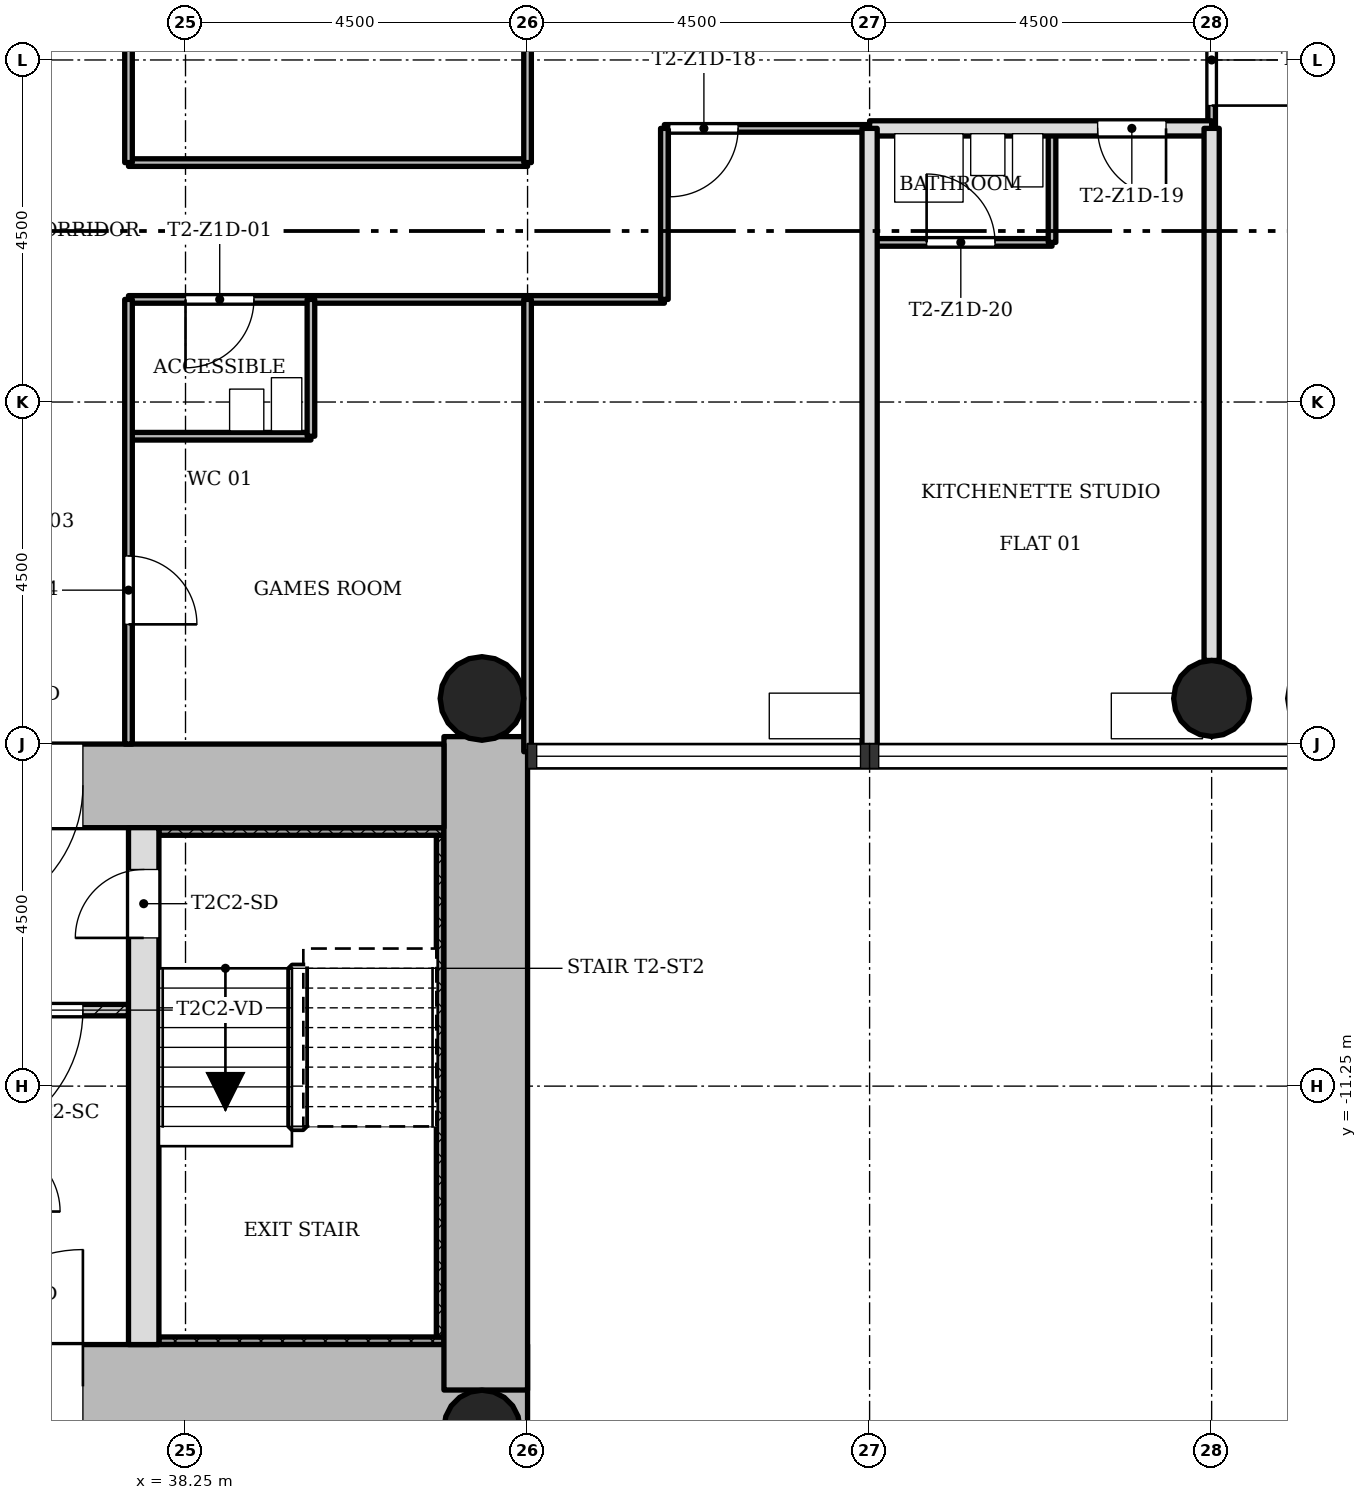
"""IFC4 building model, lengths in metres.
Left out: names, types, materials, properties, quantities, classifications, styles, units other than length and angle.
Written with IfcOpenShell. Run it as: python <this file> out.ifc"""

import sys

from ifc_helpers import new_model, si_unit, direction, frame, frame_2d, origin, origin_2d, place, context, subcontext, project, spatial, rectangle, hollow_circle, extrude, element, fill, save


model = new_model("IFC4")
c1 = context("Model", 3, precision=1e-05, world=origin(), true_north=direction((0.0, 1.0)))
c2 = subcontext(c1, "Body", "Model", "MODEL_VIEW")
j1 = project(units=[si_unit("LENGTHUNIT", "METRE"), si_unit("PLANEANGLEUNIT", "RADIAN")], contexts=[c1])
p1 = place(None, origin())
s1 = spatial("IfcSite", under=j1, at=p1, CompositionType="ELEMENT")
p2 = place(p1, origin())
s2 = spatial("IfcBuilding", under=s1, at=p2, CompositionType="ELEMENT")
p3 = place(p2, frame((0.0, 0.0, 61.9)))
s3 = spatial("IfcBuildingStorey", under=s2, at=p3, CompositionType="ELEMENT", Elevation=61.9)
p4 = place(p3, frame((30.35, -15.2, 0.0), z_axis=(0.0, 0.0, 1.0), x_axis=(1.0, 0.0, 0.0)))
e1 = element("IfcWall", 1, at=p4, inside=s3, PredefinedType="SHEAR", context=c2, shape_type="SweptSolid", body=[
    extrude(rectangle(XDim=12.4, YDim=1.1, at=frame_2d((6.2, 0.0))), origin(), (0.0, 0.0, 1.0), 3.4),
])
p5 = place(p4, frame((4.75, 0.0, 0.0)))
e2 = element("IfcOpeningElement", 2, at=p5, cuts=e1, PredefinedType="OPENING", context=c2, shape_type="SweptSolid", body=[
    extrude(rectangle(XDim=1.8, YDim=2.1, at=frame_2d((0.9, 1.05))), frame((0.0, 0.56, 0.0), z_axis=(0.0, -1.0, 0.0), x_axis=(1.0, 0.0, 0.0)), (0.0, 0.0, 1.0), 1.12),
])
p6 = place(p3, frame((42.2, -15.248, 0.0), z_axis=(0.0, 0.0, 1.0), x_axis=(0.0, 1.0, 0.0)))
e3 = element("IfcWall", 3, at=p6, inside=s3, PredefinedType="SHEAR", context=c2, shape_type="SweptSolid", body=[
    extrude(rectangle(XDim=8.596, YDim=1.1, at=frame_2d((4.298, 0.0))), origin(), (0.0, 0.0, 1.0), 3.4),
])
p7 = place(p3, frame((41.65, -7.3, 0.0), z_axis=(0.0, 0.0, 1.0), x_axis=(-1.0, 0.0, 0.0)))
e4 = element("IfcWall", 4, at=p7, inside=s3, PredefinedType="SHEAR", context=c2, shape_type="SweptSolid", body=[
    extrude(rectangle(XDim=12.4, YDim=1.1, at=frame_2d((6.2, 0.0))), origin(), (0.0, 0.0, 1.0), 3.4),
])
p8 = place(p7, frame((4.75, 0.0, 0.0)))
e5 = element("IfcOpeningElement", 5, at=p8, cuts=e4, PredefinedType="OPENING", context=c2, shape_type="SweptSolid", body=[
    extrude(rectangle(XDim=1.8, YDim=2.1, at=frame_2d((0.9, 1.05))), frame((0.0, 0.56, 0.0), z_axis=(0.0, -1.0, 0.0), x_axis=(1.0, 0.0, 0.0)), (0.0, 0.0, 1.0), 1.12),
])
p9 = place(p3, frame((37.7, -14.65, 0.0), z_axis=(0.0, 0.0, 1.0), x_axis=(0.0, 1.0, 0.0)))
e6 = element("IfcWall", 6, at=p9, inside=s3, PredefinedType="SHEAR", context=c2, shape_type="SweptSolid", body=[
    extrude(rectangle(XDim=6.8, YDim=0.4, at=frame_2d((3.4, 0.0))), origin(), (0.0, 0.0, 1.0), 3.4),
])
p10 = place(p9, frame((5.35, 0.0, 0.0)))
e7 = element("IfcOpeningElement", 7, at=p10, cuts=e6, PredefinedType="OPENING", context=c2, shape_type="SweptSolid", body=[
    extrude(rectangle(XDim=0.9, YDim=2.1, at=frame_2d((0.45, 1.05))), frame((0.0, 0.21, 0.0), z_axis=(0.0, -1.0, 0.0), x_axis=(1.0, 0.0, 0.0)), (0.0, 0.0, 1.0), 0.42),
])
for number, where, z_axis, x_axis in (
    (8, (42.15, -15.75, 0.0), (0.0, 0.0, 1.0), (1.0, 0.0, 0.0)),
    (9, (51.75, -6.15, 0.0), (0.0, 0.0, 1.0), (1.0, 0.0, 0.0)),
):
    element("IfcColumn", number, at=place(p3, frame(where, z_axis=z_axis, x_axis=x_axis)), inside=s3, PredefinedType="COLUMN", context=c2, shape_type="SweptSolid", body=[
        extrude(hollow_circle(Radius=0.5, WallThickness=0.036, at=origin_2d()), origin(), (0.0, 0.0, 1.0), 3.4),
    ])
p11 = place(p3, frame((42.15, -6.15, 0.0), z_axis=(0.0, 0.0, 1.0), x_axis=(1.0, 0.0, 0.0)))
e10 = element("IfcColumn", 10, at=p11, inside=s3, PredefinedType="COLUMN", context=c2, shape_type="SweptSolid", body=[
    extrude(hollow_circle(Radius=0.55, WallThickness=0.04, at=origin_2d()), origin(), (0.0, 0.0, 1.0), 3.4),
])
p12 = place(p3, frame((34.5, -10.25, 0.0), z_axis=(0.0, 0.0, 1.0), x_axis=(1.0, 0.0, 0.0)))
e11 = element("IfcWall", 11, at=p12, inside=s3, PredefinedType="PARTITIONING", context=c2, shape_type="SweptSolid", body=[
    extrude(rectangle(XDim=3.0, YDim=0.15, at=frame_2d((1.5, 0.0))), origin(), (0.0, 0.0, 1.0), 3.0),
])
p13 = place(p12, frame((0.6, 0.0, 0.0)))
e12 = element("IfcOpeningElement", 12, at=p13, cuts=e11, PredefinedType="OPENING", context=c2, shape_type="SweptSolid", body=[
    extrude(rectangle(XDim=1.8, YDim=2.1, at=frame_2d((0.9, 1.05))), frame((0.0, 0.085, 0.0), z_axis=(0.0, -1.0, 0.0), x_axis=(1.0, 0.0, 0.0)), (0.0, 0.0, 1.0), 0.17),
])
p14 = place(p3, frame((39.9, -2.7, 0.0), z_axis=(0.0, 0.0, 1.0), x_axis=(-1.0, 0.0, 0.0)))
e13 = element("IfcWall", 13, at=p14, inside=s3, PredefinedType="PARTITIONING", context=c2, shape_type="SweptSolid", body=[
    extrude(rectangle(XDim=2.4, YDim=0.1, at=frame_2d((1.2, 0.0))), origin(), (0.0, 0.0, 1.0), 3.0),
])
p15 = place(p3, frame((44.55, -0.9, 0.0), z_axis=(0.0, 0.0, 1.0), x_axis=(-1.0, 0.0, 0.0)))
e14 = element("IfcWall", 14, at=p15, inside=s3, PredefinedType="PARTITIONING", context=c2, shape_type="SweptSolid", body=[
    extrude(rectangle(XDim=7.05, YDim=0.1, at=frame_2d((3.525, 0.0))), origin(), (0.0, 0.0, 1.0), 3.0),
])
p16 = place(p15, frame((5.4, 0.0, 0.0)))
e15 = element("IfcOpeningElement", 15, at=p16, cuts=e14, PredefinedType="OPENING", context=c2, shape_type="SweptSolid", body=[
    extrude(rectangle(XDim=0.9, YDim=2.1, at=frame_2d((0.45, 1.05))), frame((0.0, 0.06, 0.0), z_axis=(0.0, -1.0, 0.0), x_axis=(1.0, 0.0, 0.0)), (0.0, 0.0, 1.0), 0.12),
])
p17 = place(p3, frame((49.65, -0.15, 0.0), z_axis=(0.0, 0.0, 1.0), x_axis=(-1.0, 0.0, 0.0)))
e16 = element("IfcWall", 16, at=p17, inside=s3, PredefinedType="PARTITIONING", context=c2, shape_type="SweptSolid", body=[
    extrude(rectangle(XDim=2.4, YDim=0.1, at=frame_2d((1.2, 0.0))), origin(), (0.0, 0.0, 1.0), 3.0),
])
p18 = place(p17, frame((0.75, 0.0, 0.0)))
e17 = element("IfcOpeningElement", 17, at=p18, cuts=e16, PredefinedType="OPENING", context=c2, shape_type="SweptSolid", body=[
    extrude(rectangle(XDim=0.9, YDim=2.1, at=frame_2d((0.45, 1.05))), frame((0.0, 0.06, 0.0), z_axis=(0.0, -1.0, 0.0), x_axis=(1.0, 0.0, 0.0)), (0.0, 0.0, 1.0), 0.12),
])
p19 = place(p3, frame((42.75, 0.9, 0.0), z_axis=(0.0, 0.0, 1.0), x_axis=(-1.0, 0.0, 0.0)))
e18 = element("IfcWall", 18, at=p19, inside=s3, PredefinedType="PARTITIONING", context=c2, shape_type="SweptSolid", body=[
    extrude(rectangle(XDim=5.25, YDim=0.1, at=frame_2d((2.625, 0.0))), origin(), (0.0, 0.0, 1.0), 3.0),
])
p20 = place(p3, frame((47.25, 1.35, 0.0), z_axis=(0.0, 0.0, 1.0), x_axis=(-1.0, 0.0, 0.0)))
e19 = element("IfcWall", 19, at=p20, inside=s3, PredefinedType="PARTITIONING", context=c2, shape_type="SweptSolid", body=[
    extrude(rectangle(XDim=2.7, YDim=0.1, at=frame_2d((1.35, 0.0))), origin(), (0.0, 0.0, 1.0), 3.0),
])
p21 = place(p20, frame((1.73, 0.0, 0.0)))
e20 = element("IfcOpeningElement", 20, at=p21, cuts=e19, PredefinedType="OPENING", context=c2, shape_type="SweptSolid", body=[
    extrude(rectangle(XDim=0.9, YDim=2.1, at=frame_2d((0.45, 1.05))), frame((0.0, 0.06, 0.0), z_axis=(0.0, -1.0, 0.0), x_axis=(1.0, 0.0, 0.0)), (0.0, 0.0, 1.0), 0.12),
])
p22 = place(p3, frame((51.75, 1.35, 0.0), z_axis=(0.0, 0.0, 1.0), x_axis=(-1.0, 0.0, 0.0)))
e21 = element("IfcWall", 21, at=p22, inside=s3, PredefinedType="SOLIDWALL", context=c2, shape_type="SweptSolid", body=[
    extrude(rectangle(XDim=4.5, YDim=0.2, at=frame_2d((2.25, 0.0))), origin(), (0.0, 0.0, 1.0), 3.0),
])
p23 = place(p22, frame((0.6, 0.0, 0.0)))
e22 = element("IfcOpeningElement", 22, at=p23, cuts=e21, PredefinedType="OPENING", context=c2, shape_type="SweptSolid", body=[
    extrude(rectangle(XDim=0.9, YDim=2.1, at=frame_2d((0.45, 1.05))), frame((0.0, 0.11, 0.0), z_axis=(0.0, -1.0, 0.0), x_axis=(1.0, 0.0, 0.0)), (0.0, 0.0, 1.0), 0.22),
])
p24 = place(p3, frame((51.75, 1.35, 0.0), z_axis=(0.0, 0.0, 1.0), x_axis=(0.0, 1.0, 0.0)))
e23 = element("IfcWall", 23, at=p24, inside=s3, PredefinedType="PARTITIONING", context=c2, shape_type="SweptSolid", body=[
    extrude(rectangle(XDim=4.3, YDim=0.1, at=frame_2d((2.15, 0.0))), origin(), (0.0, 0.0, 1.0), 3.0),
])
p25 = place(p24, frame((0.3, 0.0, 0.0)))
e24 = element("IfcOpeningElement", 24, at=p25, cuts=e23, PredefinedType="OPENING", context=c2, shape_type="SweptSolid", body=[
    extrude(rectangle(XDim=1.2, YDim=2.1, at=frame_2d((0.6, 1.05))), frame((0.0, 0.06, 0.0), z_axis=(0.0, -1.0, 0.0), x_axis=(1.0, 0.0, 0.0)), (0.0, 0.0, 1.0), 0.12),
])
p26 = place(p3, frame((51.75, -5.65, 0.0), z_axis=(0.0, 0.0, 1.0), x_axis=(0.0, 1.0, 0.0)))
e25 = element("IfcWall", 25, at=p26, inside=s3, PredefinedType="SOLIDWALL", context=c2, shape_type="SweptSolid", body=[
    extrude(rectangle(XDim=7.0, YDim=0.2, at=frame_2d((3.5, 0.0))), origin(), (0.0, 0.0, 1.0), 3.0),
])
p27 = place(p3, frame((49.65, -0.15, 0.0), z_axis=(0.0, 0.0, 1.0), x_axis=(0.0, 1.0, 0.0)))
e26 = element("IfcWall", 26, at=p27, inside=s3, PredefinedType="PARTITIONING", context=c2, shape_type="SweptSolid", body=[
    extrude(rectangle(XDim=1.5, YDim=0.1, at=frame_2d((0.75, 0.0))), origin(), (0.0, 0.0, 1.0), 3.0),
])
p28 = place(p3, frame((47.25, -6.85, 0.0), z_axis=(0.0, 0.0, 1.0), x_axis=(0.0, 1.0, 0.0)))
e27 = element("IfcWall", 27, at=p28, inside=s3, PredefinedType="SOLIDWALL", context=c2, shape_type="SweptSolid", body=[
    extrude(rectangle(XDim=8.2, YDim=0.2, at=frame_2d((4.1, 0.0))), origin(), (0.0, 0.0, 1.0), 3.0),
])
p29 = place(p3, frame((44.55, -0.9, 0.0), z_axis=(0.0, 0.0, 1.0), x_axis=(0.0, 1.0, 0.0)))
e28 = element("IfcWall", 28, at=p29, inside=s3, PredefinedType="PARTITIONING", context=c2, shape_type="SweptSolid", body=[
    extrude(rectangle(XDim=2.25, YDim=0.1, at=frame_2d((1.125, 0.0))), origin(), (0.0, 0.0, 1.0), 3.0),
])
for number, where, z_axis, x_axis in (
    (29, (42.75, -6.85, 0.0), (0.0, 0.0, 1.0), (0.0, 1.0, 0.0)),
    (30, (42.75, 0.9, 0.0), (0.0, 0.0, 1.0), (0.0, 1.0, 0.0)),
):
    element("IfcWall", number, at=place(p3, frame(where, z_axis=z_axis, x_axis=x_axis)), inside=s3, PredefinedType="PARTITIONING", context=c2, shape_type="SweptSolid", body=[
        extrude(rectangle(XDim=5.95, YDim=0.1, at=frame_2d((2.975, 0.0))), origin(), (0.0, 0.0, 1.0), 3.0),
    ])
p30 = place(p3, frame((39.9, -2.7, 0.0), z_axis=(0.0, 0.0, 1.0), x_axis=(0.0, 1.0, 0.0)))
e31 = element("IfcWall", 31, at=p30, inside=s3, PredefinedType="PARTITIONING", context=c2, shape_type="SweptSolid", body=[
    extrude(rectangle(XDim=1.8, YDim=0.1, at=frame_2d((0.9, 0.0))), origin(), (0.0, 0.0, 1.0), 3.0),
])
p31 = place(p3, frame((37.5, -6.75, 0.0), z_axis=(0.0, 0.0, 1.0), x_axis=(0.0, 1.0, 0.0)))
e32 = element("IfcWall", 32, at=p31, inside=s3, PredefinedType="PARTITIONING", context=c2, shape_type="SweptSolid", body=[
    extrude(rectangle(XDim=5.85, YDim=0.1, at=frame_2d((2.925, 0.0))), origin(), (0.0, 0.0, 1.0), 3.0),
])
p32 = place(p31, frame((1.575, 0.0, 0.0)))
e33 = element("IfcOpeningElement", 33, at=p32, cuts=e32, PredefinedType="OPENING", context=c2, shape_type="SweptSolid", body=[
    extrude(rectangle(XDim=0.9, YDim=2.1, at=frame_2d((0.45, 1.05))), frame((0.0, 0.06, 0.0), z_axis=(0.0, -1.0, 0.0), x_axis=(1.0, 0.0, 0.0)), (0.0, 0.0, 1.0), 0.12),
])
p33 = place(p3, frame((37.5, 0.9, 0.0), z_axis=(0.0, 0.0, 1.0), x_axis=(0.0, 1.0, 0.0)))
e34 = element("IfcWall", 34, at=p33, inside=s3, PredefinedType="PARTITIONING", context=c2, shape_type="SweptSolid", body=[
    extrude(rectangle(XDim=5.85, YDim=0.1, at=frame_2d((2.925, 0.0))), origin(), (0.0, 0.0, 1.0), 3.0),
])
p34 = place(p33, frame((2.475, 0.0, 0.0)))
e35 = element("IfcOpeningElement", 35, at=p34, cuts=e34, PredefinedType="OPENING", context=c2, shape_type="SweptSolid", body=[
    extrude(rectangle(XDim=0.9, YDim=2.1, at=frame_2d((0.45, 1.05))), frame((0.0, 0.06, 0.0), z_axis=(0.0, -1.0, 0.0), x_axis=(1.0, 0.0, 0.0)), (0.0, 0.0, 1.0), 0.12),
])
p35 = place(p3, frame((37.9, -14.6, 0.0), z_axis=(0.0, 0.0, 1.0), x_axis=(1.0, 0.0, 0.0)))
e36 = element("IfcWall", 36, at=p35, inside=s3, PredefinedType="SHEAR", context=c2, shape_type="SweptSolid", body=[
    extrude(rectangle(XDim=3.75, YDim=0.1, at=frame_2d((1.875, 0.0))), origin(), (0.0, 0.0, 1.0), 3.4),
])
p36 = place(p3, frame((41.6, -7.95, 0.0), z_axis=(0.0, 0.0, 1.0), x_axis=(0.0, -1.0, 0.0)))
e37 = element("IfcWall", 37, at=p36, inside=s3, PredefinedType="SHEAR", context=c2, shape_type="SweptSolid", body=[
    extrude(rectangle(XDim=6.6, YDim=0.1, at=frame_2d((3.3, 0.0))), origin(), (0.0, 0.0, 1.0), 3.4),
])
p37 = place(p3, frame((37.9, -7.9, 0.0), z_axis=(0.0, 0.0, 1.0), x_axis=(1.0, 0.0, 0.0)))
e38 = element("IfcWall", 38, at=p37, inside=s3, PredefinedType="SHEAR", context=c2, shape_type="SweptSolid", body=[
    extrude(rectangle(XDim=3.75, YDim=0.1, at=frame_2d((1.875, 0.0))), origin(), (0.0, 0.0, 1.0), 3.4),
])
p38 = place(p13, origin())
e39 = element("IfcDoor", 39, at=p38, inside=s3, OperationType="SINGLE_SWING_LEFT", PredefinedType="DOOR", context=c2, shape_type="SweptSolid", body=[
    extrude(rectangle(XDim=1.8, YDim=2.1, at=frame_2d((0.9, 1.05))), frame((0.0, 0.025, 0.0), z_axis=(0.0, -1.0, 0.0), x_axis=(1.0, 0.0, 0.0)), (0.0, 0.0, 1.0), 0.05),
])
fill(e12, e39)
p39 = place(p16, origin())
e40 = element("IfcDoor", 40, at=p39, inside=s3, OperationType="SINGLE_SWING_LEFT", PredefinedType="DOOR", context=c2, shape_type="SweptSolid", body=[
    extrude(rectangle(XDim=0.9, YDim=2.1, at=frame_2d((0.45, 1.05))), frame((0.0, 0.025, 0.0), z_axis=(0.0, -1.0, 0.0), x_axis=(1.0, 0.0, 0.0)), (0.0, 0.0, 1.0), 0.05),
])
fill(e15, e40)
p40 = place(p32, origin())
e41 = element("IfcDoor", 41, at=p40, inside=s3, OperationType="SINGLE_SWING_LEFT", PredefinedType="DOOR", context=c2, shape_type="SweptSolid", body=[
    extrude(rectangle(XDim=0.9, YDim=2.1, at=frame_2d((0.45, 1.05))), frame((0.0, 0.025, 0.0), z_axis=(0.0, -1.0, 0.0), x_axis=(1.0, 0.0, 0.0)), (0.0, 0.0, 1.0), 0.05),
])
fill(e33, e41)
p41 = place(p21, origin())
e42 = element("IfcDoor", 42, at=p41, inside=s3, OperationType="SINGLE_SWING_LEFT", PredefinedType="DOOR", context=c2, shape_type="SweptSolid", body=[
    extrude(rectangle(XDim=0.9, YDim=2.1, at=frame_2d((0.45, 1.05))), frame((0.0, 0.025, 0.0), z_axis=(0.0, -1.0, 0.0), x_axis=(1.0, 0.0, 0.0)), (0.0, 0.0, 1.0), 0.05),
])
fill(e20, e42)
p42 = place(p23, origin())
e43 = element("IfcDoor", 43, at=p42, inside=s3, OperationType="SINGLE_SWING_RIGHT", PredefinedType="DOOR", context=c2, shape_type="SweptSolid", body=[
    extrude(rectangle(XDim=0.9, YDim=2.1, at=frame_2d((0.45, 1.05))), frame((0.0, 0.025, 0.0), z_axis=(0.0, -1.0, 0.0), x_axis=(1.0, 0.0, 0.0)), (0.0, 0.0, 1.0), 0.05),
])
fill(e22, e43)
p43 = place(p18, origin())
e44 = element("IfcDoor", 44, at=p43, inside=s3, OperationType="SINGLE_SWING_RIGHT", PredefinedType="DOOR", context=c2, shape_type="SweptSolid", body=[
    extrude(rectangle(XDim=0.9, YDim=2.1, at=frame_2d((0.45, 1.05))), frame((0.0, 0.025, 0.0), z_axis=(0.0, -1.0, 0.0), x_axis=(1.0, 0.0, 0.0)), (0.0, 0.0, 1.0), 0.05),
])
fill(e17, e44)
p44 = place(p25, origin())
e45 = element("IfcDoor", 45, at=p44, inside=s3, OperationType="SINGLE_SWING_LEFT", PredefinedType="DOOR", context=c2, shape_type="SweptSolid", body=[
    extrude(rectangle(XDim=1.2, YDim=2.1, at=frame_2d((0.6, 1.05))), frame((0.0, 0.025, 0.0), z_axis=(0.0, -1.0, 0.0), x_axis=(1.0, 0.0, 0.0)), (0.0, 0.0, 1.0), 0.05),
])
fill(e24, e45)
p45 = place(p10, origin())
e46 = element("IfcDoor", 46, at=p45, inside=s3, OperationType="SINGLE_SWING_RIGHT", PredefinedType="DOOR", context=c2, shape_type="SweptSolid", body=[
    extrude(rectangle(XDim=0.9, YDim=2.1, at=frame_2d((0.45, 1.05))), frame((0.0, 0.025, 0.0), z_axis=(0.0, -1.0, 0.0), x_axis=(1.0, 0.0, 0.0)), (0.0, 0.0, 1.0), 0.05),
])
fill(e7, e46)
p46 = place(p8, origin())
e47 = element("IfcDoor", 47, at=p46, inside=s3, OperationType="SINGLE_SWING_LEFT", PredefinedType="DOOR", context=c2, shape_type="SweptSolid", body=[
    extrude(rectangle(XDim=1.8, YDim=2.1, at=frame_2d((0.9, 1.05))), frame((0.0, 0.025, 0.0), z_axis=(0.0, -1.0, 0.0), x_axis=(1.0, 0.0, 0.0)), (0.0, 0.0, 1.0), 0.05),
])
fill(e5, e47)
p47 = place(p5, origin())
e48 = element("IfcDoor", 48, at=p47, inside=s3, OperationType="SINGLE_SWING_LEFT", PredefinedType="DOOR", context=c2, shape_type="SweptSolid", body=[
    extrude(rectangle(XDim=1.8, YDim=2.1, at=frame_2d((0.9, 1.05))), frame((0.0, 0.025, 0.0), z_axis=(0.0, -1.0, 0.0), x_axis=(1.0, 0.0, 0.0)), (0.0, 0.0, 1.0), 0.05),
])
fill(e2, e48)
save(model, sys.argv[1])
